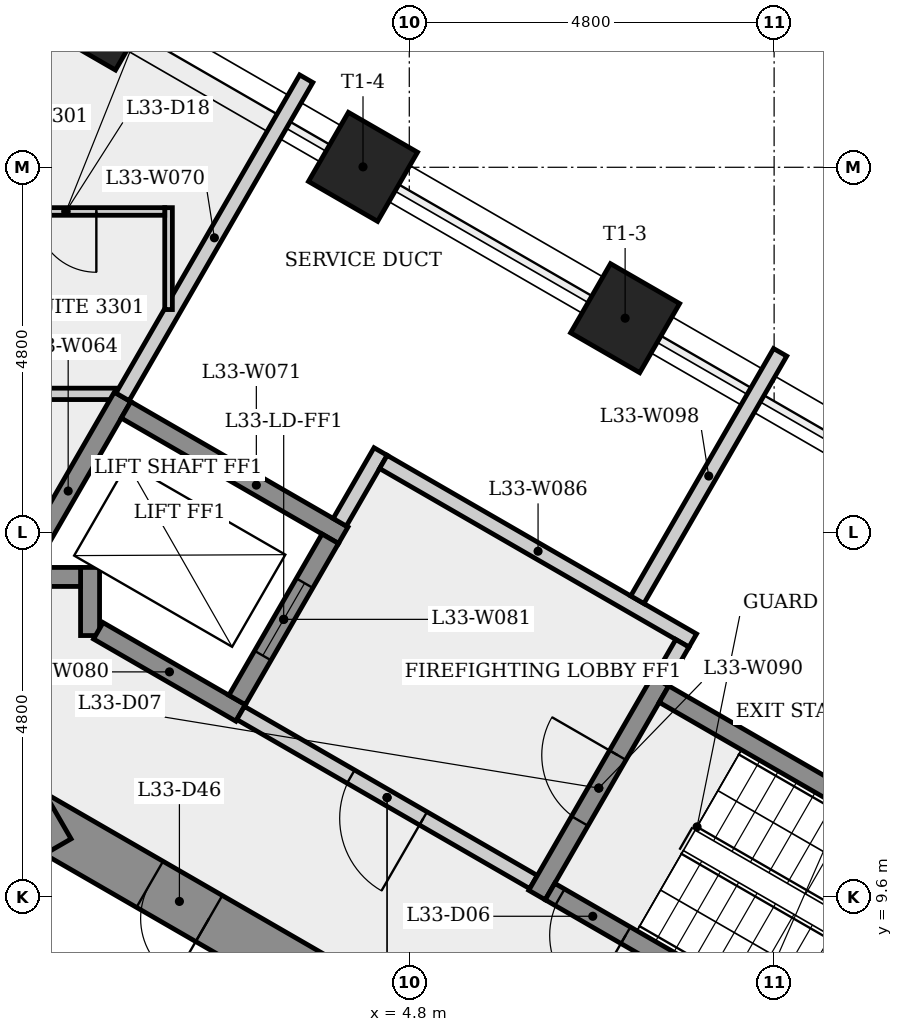
"""IFC4 building model, lengths in metres.
Left out: names, types, materials, properties, quantities, classifications, styles, units other than length and angle.
Written with IfcOpenShell. Run it as: python <this file> out.ifc"""

import sys

from ifc_helpers import new_model, si_unit, direction, frame, frame_2d, origin, origin_2d, place, context, subcontext, project, spatial, rectangle, extrude, element, fill, save


model = new_model("IFC4")
c1 = context("Model", 3, precision=1e-05, world=origin(), true_north=direction((0.0, 1.0)))
c2 = subcontext(c1, "Body", "Model", "MODEL_VIEW")
j1 = project(units=[si_unit("LENGTHUNIT", "METRE"), si_unit("PLANEANGLEUNIT", "RADIAN")], contexts=[c1])
p1 = place(None, origin())
s1 = spatial("IfcSite", under=j1, at=p1, CompositionType="ELEMENT")
p2 = place(p1, origin())
s2 = spatial("IfcBuilding", under=s1, at=p2, CompositionType="ELEMENT")
p3 = place(p2, frame((0.0, 0.0, 124.5)))
s3 = spatial("IfcBuildingStorey", under=s2, at=p3, CompositionType="ELEMENT", Elevation=124.5)
p4 = place(p3, frame((9.325, 5.182, 0.0), z_axis=(0.0, 0.0, 1.0), x_axis=(-0.866023993627, 0.500002442456, 0.0)))
e1 = element("IfcWall", 1, at=p4, inside=s3, PredefinedType="SHEAR", context=c2, shape_type="SweptSolid", body=[
    extrude(rectangle(XDim=10.97, YDim=0.7, at=frame_2d((5.485, 0.0))), origin(), (0.0, 0.0, 1.0), 4.0),
])
p5 = place(p4, frame((8.267, 0.0, 0.0)))
e2 = element("IfcOpeningElement", 2, at=p5, cuts=e1, PredefinedType="OPENING", context=c2, shape_type="SweptSolid", body=[
    extrude(rectangle(XDim=0.9, YDim=2.1, at=frame_2d((0.45, 1.05))), frame((0.0, 0.36, 0.0), z_axis=(0.0, -1.0, 0.0), x_axis=(1.0, 0.0, 0.0)), (0.0, 0.0, 1.0), 0.72),
])
p6 = place(p4, frame((1.547, 0.0, 0.0)))
e3 = element("IfcOpeningElement", 3, at=p6, cuts=e1, PredefinedType="OPENING", context=c2, shape_type="SweptSolid", body=[
    extrude(rectangle(XDim=0.9, YDim=2.1, at=frame_2d((0.45, 1.05))), frame((0.0, 0.36, 0.0), z_axis=(0.0, -1.0, 0.0), x_axis=(1.0, 0.0, 0.0)), (0.0, 0.0, 1.0), 0.72),
])
p7 = place(p3, frame((0.175, 10.667, 0.0), z_axis=(0.0, 0.0, 1.0), x_axis=(-0.866023993627, -0.500002442456, 0.0)))
e4 = element("IfcWall", 4, at=p7, inside=s3, PredefinedType="SHEAR", context=c2, shape_type="SweptSolid", body=[
    extrude(rectangle(XDim=10.97, YDim=0.7, at=frame_2d((5.485, 0.0))), origin(), (0.0, 0.0, 1.0), 4.0),
])
p8 = place(p7, frame((8.985, 0.0, 0.0)))
e5 = element("IfcOpeningElement", 5, at=p8, cuts=e4, PredefinedType="OPENING", context=c2, shape_type="SweptSolid", body=[
    extrude(rectangle(XDim=0.9, YDim=2.1, at=frame_2d((0.45, 1.05))), frame((0.0, 0.36, 0.0), z_axis=(0.0, -1.0, 0.0), x_axis=(1.0, 0.0, 0.0)), (0.0, 0.0, 1.0), 0.72),
])
p9 = place(p7, frame((2.495, 0.0, 0.0)))
e6 = element("IfcOpeningElement", 6, at=p9, cuts=e4, PredefinedType="OPENING", context=c2, shape_type="SweptSolid", body=[
    extrude(rectangle(XDim=0.9, YDim=2.1, at=frame_2d((0.45, 1.05))), frame((0.0, 0.36, 0.0), z_axis=(0.0, -1.0, 0.0), x_axis=(1.0, 0.0, 0.0)), (0.0, 0.0, 1.0), 0.72),
])
for number, where, z_axis, x_axis in (
    (7, (7.64, 17.214, 0.0), (0.0, 0.0, 1.0), (0.5, 0.866, 0.0)),
    (8, (4.191, 19.206, 0.0), (0.0, 0.0, 1.0), (0.5, 0.866, 0.0)),
    (9, (0.742, 21.197, 0.0), (0.0, 0.0, 1.0), (0.5, 0.866, 0.0)),
):
    element("IfcColumn", number, at=place(p3, frame(where, z_axis=z_axis, x_axis=x_axis)), inside=s3, PredefinedType="COLUMN", context=c2, shape_type="SweptSolid", body=[
        extrude(rectangle(XDim=1.05, YDim=1.05, at=origin_2d()), origin(), (0.0, 0.0, 1.0), 4.0),
    ])
p10 = place(p3, frame((-3.423, 16.219, 0.0), z_axis=(0.0, 0.0, 1.0), x_axis=(1.0, 0.0, 0.0)))
e10 = element("IfcWall", 10, at=p10, inside=s3, PredefinedType="PARTITIONING", context=c2, shape_type="SweptSolid", body=[
    extrude(rectangle(XDim=4.373, YDim=0.15, at=frame_2d((2.186, 0.0))), origin(), (0.0, 0.0, 1.0), 3.6),
])
p11 = place(p10, frame((0.768, 0.0, 0.0)))
e11 = element("IfcOpeningElement", 11, at=p11, cuts=e10, PredefinedType="OPENING", context=c2, shape_type="SweptSolid", body=[
    extrude(rectangle(XDim=0.9, YDim=2.1, at=frame_2d((0.45, 1.05))), frame((0.0, 0.085, 0.0), z_axis=(0.0, -1.0, 0.0), x_axis=(1.0, 0.0, 0.0)), (0.0, 0.0, 1.0), 0.17),
])
p12 = place(p3, frame((-0.403, 13.702, 0.0), z_axis=(0.0, 0.0, 1.0), x_axis=(0.499976111731, 0.866039195244, 0.0)))
e12 = element("IfcWall", 12, at=p12, inside=s3, PredefinedType="SHEAR", context=c2, shape_type="SweptSolid", body=[
    extrude(rectangle(XDim=2.861, YDim=0.25, at=frame_2d((1.43, 0.0))), origin(), (0.0, 0.0, 1.0), 3.6),
])
p13 = place(p3, frame((0.6, 13.039, 0.0), z_axis=(0.0, 0.0, 1.0), x_axis=(0.0, 1.0, 0.0)))
e13 = element("IfcWall", 13, at=p13, inside=s3, PredefinedType="SHEAR", context=c2, shape_type="SweptSolid", body=[
    extrude(rectangle(XDim=0.896, YDim=0.25, at=frame_2d((0.448, 0.0))), origin(), (0.0, 0.0, 1.0), 3.6),
])
p14 = place(p3, frame((0.475, 13.81, 0.0), z_axis=(0.0, 0.0, 1.0), x_axis=(-1.0, 0.0, 0.0)))
e14 = element("IfcWall", 14, at=p14, inside=s3, PredefinedType="SHEAR", context=c2, shape_type="SweptSolid", body=[
    extrude(rectangle(XDim=0.691, YDim=0.25, at=frame_2d((0.345, 0.0))), origin(), (0.0, 0.0, 1.0), 4.0),
])
p15 = place(p3, frame((1.027, 16.179, 0.0), z_axis=(0.0, 0.0, 1.0), x_axis=(0.500006626369, 0.866021578015, 0.0)))
e15 = element("IfcWall", 15, at=p15, inside=s3, PredefinedType="PLUMBINGWALL", context=c2, shape_type="SweptSolid", body=[
    extrude(rectangle(XDim=4.834, YDim=0.2, at=frame_2d((2.417, 0.0))), origin(), (0.0, 0.0, 1.0), 3.6),
])
p16 = place(p3, frame((1.073, 16.008, 0.0), z_axis=(0.0, 0.0, 1.0), x_axis=(0.866040211805, -0.499974350878, 0.0)))
e16 = element("IfcWall", 16, at=p16, inside=s3, PredefinedType="SHEAR", context=c2, shape_type="SweptSolid", body=[
    extrude(rectangle(XDim=3.3, YDim=0.25, at=frame_2d((1.65, 0.0))), origin(), (0.0, 0.0, 1.0), 3.6),
])
p17 = place(p3, frame((1.633, 17.328, 0.0), z_axis=(0.0, 0.0, 1.0), x_axis=(0.0, 1.0, 0.0)))
e17 = element("IfcWall", 17, at=p17, inside=s3, PredefinedType="PARTITIONING", context=c2, shape_type="SweptSolid", body=[
    extrude(rectangle(XDim=1.341, YDim=0.1, at=frame_2d((0.67, 0.0))), origin(), (0.0, 0.0, 1.0), 3.6),
])
p18 = place(p3, frame((1.583, 18.619, 0.0), z_axis=(0.0, 0.0, 1.0), x_axis=(-1.0, 0.0, 0.0)))
e18 = element("IfcWall", 18, at=p18, inside=s3, PredefinedType="PARTITIONING", context=c2, shape_type="SweptSolid", body=[
    extrude(rectangle(XDim=2.6, YDim=0.1, at=frame_2d((1.3, 0.0))), origin(), (0.0, 0.0, 1.0), 3.6),
])
p19 = place(p18, frame((0.9, 0.0, 0.0)))
e19 = element("IfcOpeningElement", 19, at=p19, cuts=e18, PredefinedType="OPENING", context=c2, shape_type="SweptSolid", body=[
    extrude(rectangle(XDim=0.8, YDim=2.1, at=frame_2d((0.4, 1.05))), frame((0.0, 0.06, 0.0), z_axis=(0.0, -1.0, 0.0), x_axis=(1.0, 0.0, 0.0)), (0.0, 0.0, 1.0), 0.12),
])
p20 = place(p3, frame((2.581, 12.02, 0.0), z_axis=(0.0, 0.0, 1.0), x_axis=(-0.86603892542, 0.499976579108, 0.0)))
e20 = element("IfcWall", 20, at=p20, inside=s3, PredefinedType="SHEAR", context=c2, shape_type="SweptSolid", body=[
    extrude(rectangle(XDim=2.162, YDim=0.25, at=frame_2d((1.081, 0.0))), origin(), (0.0, 0.0, 1.0), 3.6),
])
p21 = place(p3, frame((2.535, 12.191, 0.0), z_axis=(0.0, 0.0, 1.0), x_axis=(0.500061746146, 0.865989751695, 0.0)))
e21 = element("IfcWall", 21, at=p21, inside=s3, PredefinedType="SHEAR", context=c2, shape_type="SweptSolid", body=[
    extrude(rectangle(XDim=2.45, YDim=0.25, at=frame_2d((1.225, 0.0))), origin(), (0.0, 0.0, 1.0), 4.0),
])
p22 = place(p21, frame((0.675, 0.0, 0.0)))
e22 = element("IfcOpeningElement", 22, at=p22, cuts=e21, PredefinedType="OPENING", context=c2, shape_type="SweptSolid", body=[
    extrude(rectangle(XDim=1.1, YDim=2.1, at=frame_2d((0.55, 1.05))), frame((0.0, 0.135, 0.0), z_axis=(0.0, -1.0, 0.0), x_axis=(1.0, 0.0, 0.0)), (0.0, 0.0, 1.0), 0.27),
])
p23 = place(p3, frame((3.885, 14.529, 0.0), z_axis=(0.0, 0.0, 1.0), x_axis=(0.499997628298, 0.866026773083, 0.0)))
e23 = element("IfcWall", 23, at=p23, inside=s3, PredefinedType="PLUMBINGWALL", context=c2, shape_type="SweptSolid", body=[
    extrude(rectangle(XDim=1.075, YDim=0.2, at=frame_2d((0.538, 0.0))), origin(), (0.0, 0.0, 1.0), 3.6),
])
p24 = place(p3, frame((4.459, 15.323, 0.0), z_axis=(0.0, 0.0, 1.0), x_axis=(0.866016039709, -0.500016218704, 0.0)))
e24 = element("IfcWall", 24, at=p24, inside=s3, PredefinedType="PLUMBINGWALL", context=c2, shape_type="SweptSolid", body=[
    extrude(rectangle(XDim=4.7, YDim=0.2, at=frame_2d((2.35, 0.0))), origin(), (0.0, 0.0, 1.0), 3.6),
])
p25 = place(p3, frame((6.435, 9.795, 0.0), z_axis=(0.0, 0.0, 1.0), x_axis=(-0.866012907634, 0.500021643343, 0.0)))
e25 = element("IfcWall", 25, at=p25, inside=s3, PredefinedType="PARTITIONING", context=c2, shape_type="SweptSolid", body=[
    extrude(rectangle(XDim=4.45, YDim=0.2, at=frame_2d((2.225, 0.0))), origin(), (0.0, 0.0, 1.0), 3.6),
])
p26 = place(p25, frame((1.675, 0.0, 0.0)))
e26 = element("IfcOpeningElement", 26, at=p26, cuts=e25, PredefinedType="OPENING", context=c2, shape_type="SweptSolid", body=[
    extrude(rectangle(XDim=1.1, YDim=2.1, at=frame_2d((0.55, 1.05))), frame((0.0, 0.11, 0.0), z_axis=(0.0, -1.0, 0.0), x_axis=(1.0, 0.0, 0.0)), (0.0, 0.0, 1.0), 0.22),
])
p27 = place(p3, frame((6.48, 9.624, 0.0), z_axis=(0.0, 0.0, 1.0), x_axis=(0.500017246033, 0.866015446554, 0.0)))
e27 = element("IfcWall", 27, at=p27, inside=s3, PredefinedType="SHEAR", context=c2, shape_type="SweptSolid", body=[
    extrude(rectangle(XDim=3.25, YDim=0.25, at=frame_2d((1.625, 0.0))), origin(), (0.0, 0.0, 1.0), 3.6),
])
p28 = place(p27, frame((1.125, 0.0, 0.0)))
e28 = element("IfcOpeningElement", 28, at=p28, cuts=e27, PredefinedType="OPENING", context=c2, shape_type="SweptSolid", body=[
    extrude(rectangle(XDim=1.0, YDim=2.1, at=frame_2d((0.5, 1.05))), frame((0.0, 0.135, 0.0), z_axis=(0.0, -1.0, 0.0), x_axis=(1.0, 0.0, 0.0)), (0.0, 0.0, 1.0), 0.27),
])
p29 = place(p3, frame((7.8, 13.51, 0.0), z_axis=(0.0, 0.0, 1.0), x_axis=(0.499981075744, 0.866036329433, 0.0)))
e29 = element("IfcWall", 29, at=p29, inside=s3, PredefinedType="PLUMBINGWALL", context=c2, shape_type="SweptSolid", body=[
    extrude(rectangle(XDim=3.759, YDim=0.2, at=frame_2d((1.879, 0.0))), origin(), (0.0, 0.0, 1.0), 3.6),
])
p30 = place(p3, frame((8.151, 12.268, 0.0), z_axis=(0.0, 0.0, 1.0), x_axis=(0.866025499775, -0.499999833739, 0.0)))
e30 = element("IfcWall", 30, at=p30, inside=s3, PredefinedType="SHEAR", context=c2, shape_type="SweptSolid", body=[
    extrude(rectangle(XDim=6.4, YDim=0.25, at=frame_2d((3.2, 0.0))), origin(), (0.0, 0.0, 1.0), 3.6),
])
p31 = place(p3, frame((8.393, 12.937, 0.0), z_axis=(0.0, 0.0, 1.0), x_axis=(-0.500065409566, -0.86598763626, 0.0)))
e31 = element("IfcWall", 31, at=p31, inside=s3, PredefinedType="PLUMBINGWALL", context=c2, shape_type="SweptSolid", body=[
    extrude(rectangle(XDim=0.575, YDim=0.2, at=frame_2d((0.288, 0.0))), origin(), (0.0, 0.0, 1.0), 3.6),
])
p32 = place(p3, frame((11.1, 7.101, 0.0), z_axis=(0.0, 0.0, 1.0), x_axis=(-0.8660265141, 0.499998076872, 0.0)))
e32 = element("IfcWall", 32, at=p32, inside=s3, PredefinedType="SHEAR", context=c2, shape_type="SweptSolid", body=[
    extrude(rectangle(XDim=5.137, YDim=0.25, at=frame_2d((2.569, 0.0))), origin(), (0.0, 0.0, 1.0), 3.6),
])
p33 = place(p32, frame((3.987, 0.0, 0.0)))
e33 = element("IfcOpeningElement", 33, at=p33, cuts=e32, PredefinedType="OPENING", context=c2, shape_type="SweptSolid", body=[
    extrude(rectangle(XDim=1.0, YDim=2.1, at=frame_2d((0.5, 1.05))), frame((0.0, 0.135, 0.0), z_axis=(0.0, -1.0, 0.0), x_axis=(1.0, 0.0, 0.0)), (0.0, 0.0, 1.0), 0.27),
])
p34 = place(p33, origin())
e34 = element("IfcDoor", 34, at=p34, inside=s3, OperationType="SINGLE_SWING_LEFT", PredefinedType="DOOR", context=c2, shape_type="SweptSolid", body=[
    extrude(rectangle(XDim=1.0, YDim=2.1, at=frame_2d((0.5, 1.05))), frame((0.0, 0.025, 0.0), z_axis=(0.0, -1.0, 0.0), x_axis=(1.0, 0.0, 0.0)), (0.0, 0.0, 1.0), 0.05),
])
fill(e33, e34)
p35 = place(p28, origin())
e35 = element("IfcDoor", 35, at=p35, inside=s3, OperationType="SINGLE_SWING_RIGHT", PredefinedType="DOOR", context=c2, shape_type="SweptSolid", body=[
    extrude(rectangle(XDim=1.0, YDim=2.1, at=frame_2d((0.5, 1.05))), frame((0.0, 0.025, 0.0), z_axis=(0.0, -1.0, 0.0), x_axis=(1.0, 0.0, 0.0)), (0.0, 0.0, 1.0), 0.05),
])
fill(e28, e35)
p36 = place(p26, origin())
e36 = element("IfcDoor", 36, at=p36, inside=s3, OperationType="SINGLE_SWING_LEFT", PredefinedType="DOOR", context=c2, shape_type="SweptSolid", body=[
    extrude(rectangle(XDim=1.1, YDim=2.1, at=frame_2d((0.55, 1.05))), frame((0.0, 0.025, 0.0), z_axis=(0.0, -1.0, 0.0), x_axis=(1.0, 0.0, 0.0)), (0.0, 0.0, 1.0), 0.05),
])
fill(e26, e36)
p37 = place(p22, origin())
e37 = element("IfcDoor", 37, at=p37, inside=s3, OperationType="SLIDING_TO_LEFT", PredefinedType="DOOR", context=c2, shape_type="SweptSolid", body=[
    extrude(rectangle(XDim=1.1, YDim=2.1, at=frame_2d((0.55, 1.05))), frame((0.0, 0.025, 0.0), z_axis=(0.0, -1.0, 0.0), x_axis=(1.0, 0.0, 0.0)), (0.0, 0.0, 1.0), 0.05),
])
fill(e22, e37)
p38 = place(p19, origin())
e38 = element("IfcDoor", 38, at=p38, inside=s3, OperationType="SINGLE_SWING_LEFT", PredefinedType="DOOR", context=c2, shape_type="SweptSolid", body=[
    extrude(rectangle(XDim=0.8, YDim=2.1, at=frame_2d((0.4, 1.05))), frame((0.0, 0.025, 0.0), z_axis=(0.0, -1.0, 0.0), x_axis=(1.0, 0.0, 0.0)), (0.0, 0.0, 1.0), 0.05),
])
fill(e19, e38)
p39 = place(p5, origin())
e39 = element("IfcDoor", 39, at=p39, inside=s3, OperationType="SINGLE_SWING_LEFT", PredefinedType="DOOR", context=c2, shape_type="SweptSolid", body=[
    extrude(rectangle(XDim=0.9, YDim=2.1, at=frame_2d((0.45, 1.05))), frame((0.0, 0.025, 0.0), z_axis=(0.0, -1.0, 0.0), x_axis=(1.0, 0.0, 0.0)), (0.0, 0.0, 1.0), 0.05),
])
fill(e2, e39)
save(model, sys.argv[1])
